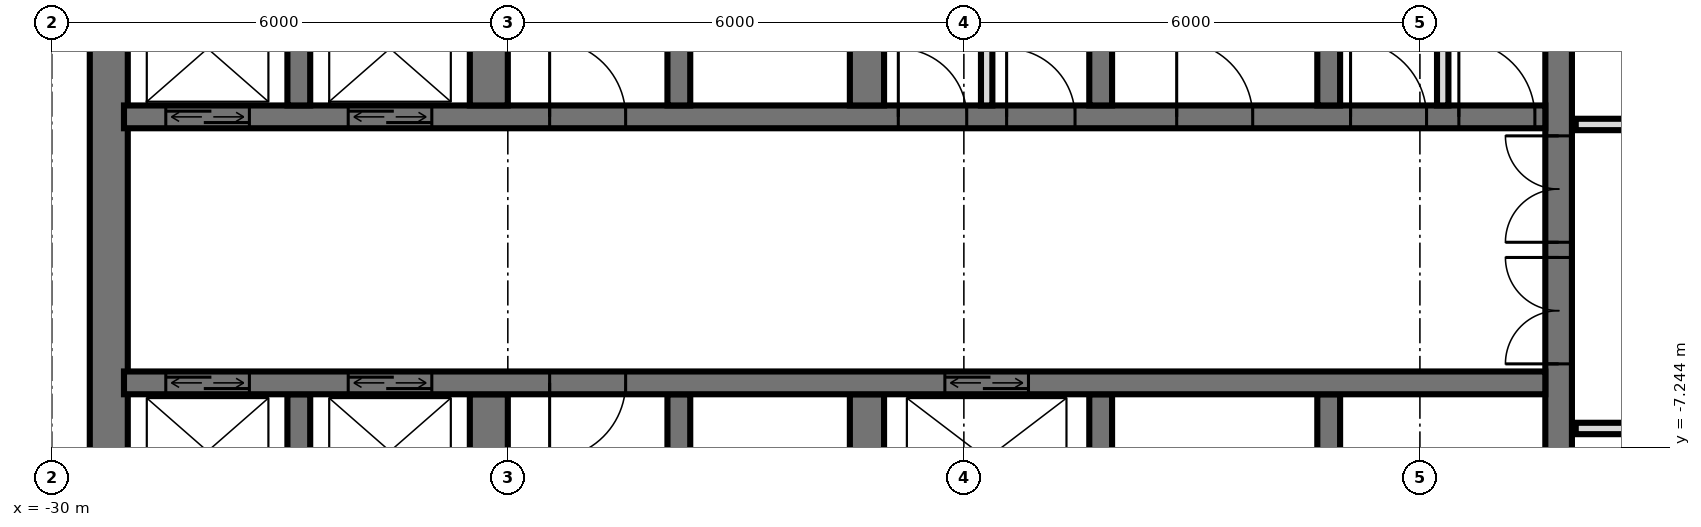
"""IFC4 building model, lengths in metres.
Left out: names, types, materials, properties, quantities, classifications, styles, units other than length and angle.
Written with IfcOpenShell. Run it as: python <this file> out.ifc"""

import sys

from ifc_helpers import new_model, si_unit, direction, frame, frame_2d, origin, place, context, subcontext, project, spatial, rectangle, extrude, element, fill, save


model = new_model("IFC4")
c1 = context("Model", 3, precision=1e-05, world=origin(), true_north=direction((0.0, 1.0)))
c2 = subcontext(c1, "Body", "Model", "MODEL_VIEW")
j1 = project(units=[si_unit("LENGTHUNIT", "METRE"), si_unit("PLANEANGLEUNIT", "RADIAN")], contexts=[c1])
p1 = place(None, origin())
s1 = spatial("IfcSite", under=j1, at=p1, CompositionType="ELEMENT")
p2 = place(p1, origin())
s2 = spatial("IfcBuilding", under=s1, at=p2, CompositionType="ELEMENT")
p3 = place(p2, frame((0.0, 0.0, 27.6)))
s3 = spatial("IfcBuildingStorey", under=s2, at=p3, CompositionType="ELEMENT", Elevation=27.6)
p4 = place(p3, frame((-10.175, -14.55, 0.0), z_axis=(0.0, 0.0, 1.0), x_axis=(0.0, 1.0, 0.0)))
e1 = element("IfcWall", 1, at=p4, inside=s3, PredefinedType="SHEAR", context=c2, shape_type="SweptSolid", body=[
    extrude(rectangle(XDim=14.1, YDim=0.35, at=frame_2d((7.05, 0.0))), origin(), (0.0, 0.0, 1.0), 3.6),
])
p5 = place(p4, frame((8.4, 0.0, 0.0)))
e2 = element("IfcOpeningElement", 2, at=p5, cuts=e1, PredefinedType="OPENING", context=c2, shape_type="SweptSolid", body=[
    extrude(rectangle(XDim=1.4, YDim=2.4, at=frame_2d((0.7, 1.2))), frame((0.0, 0.185, 0.0), z_axis=(0.0, -1.0, 0.0), x_axis=(1.0, 0.0, 0.0)), (0.0, 0.0, 1.0), 0.37),
])
p6 = place(p4, frame((10.0, 0.0, 0.0)))
e3 = element("IfcOpeningElement", 3, at=p6, cuts=e1, PredefinedType="OPENING", context=c2, shape_type="SweptSolid", body=[
    extrude(rectangle(XDim=1.4, YDim=2.4, at=frame_2d((0.7, 1.2))), frame((0.0, 0.185, 0.0), z_axis=(0.0, -1.0, 0.0), x_axis=(1.0, 0.0, 0.0)), (0.0, 0.0, 1.0), 0.37),
])
p7 = place(p4, frame((4.0, 0.0, 0.0)))
e4 = element("IfcOpeningElement", 4, at=p7, cuts=e1, PredefinedType="OPENING", context=c2, shape_type="SweptSolid", body=[
    extrude(rectangle(XDim=1.2, YDim=2.1, at=frame_2d((0.6, 1.05))), frame((0.0, 0.185, 0.0), z_axis=(0.0, -1.0, 0.0), x_axis=(1.0, 0.0, 0.0)), (0.0, 0.0, 1.0), 0.37),
])
p8 = place(p3, frame((-29.25, -14.55, 0.0), z_axis=(0.0, 0.0, 1.0), x_axis=(0.0, 1.0, 0.0)))
e5 = element("IfcWall", 5, at=p8, inside=s3, PredefinedType="SHEAR", context=c2, shape_type="SweptSolid", body=[
    extrude(rectangle(XDim=14.1, YDim=0.5, at=frame_2d((7.05, 0.0))), origin(), (0.0, 0.0, 1.0), 3.6),
])
p9 = place(p3, frame((-29.05, -2.9, 0.0), z_axis=(0.0, 0.0, 1.0), x_axis=(1.0, 0.0, 0.0)))
e6 = element("IfcWall", 6, at=p9, inside=s3, PredefinedType="SHEAR", context=c2, shape_type="SweptSolid", body=[
    extrude(rectangle(XDim=18.7, YDim=0.3, at=frame_2d((9.35, 0.0))), origin(), (0.0, 0.0, 1.0), 3.6),
])
p10 = place(p9, frame((2.95, 0.0, 0.0)))
e7 = element("IfcOpeningElement", 7, at=p10, cuts=e6, PredefinedType="OPENING", context=c2, shape_type="SweptSolid", body=[
    extrude(rectangle(XDim=1.1, YDim=2.1, at=frame_2d((0.55, 1.05))), frame((0.0, 0.16, 0.0), z_axis=(0.0, -1.0, 0.0), x_axis=(1.0, 0.0, 0.0)), (0.0, 0.0, 1.0), 0.32),
])
p11 = place(p9, frame((0.55, 0.0, 0.0)))
e8 = element("IfcOpeningElement", 8, at=p11, cuts=e6, PredefinedType="OPENING", context=c2, shape_type="SweptSolid", body=[
    extrude(rectangle(XDim=1.1, YDim=2.1, at=frame_2d((0.55, 1.05))), frame((0.0, 0.16, 0.0), z_axis=(0.0, -1.0, 0.0), x_axis=(1.0, 0.0, 0.0)), (0.0, 0.0, 1.0), 0.32),
])
p12 = place(p9, frame((11.613, 0.0, 0.0)))
e9 = element("IfcOpeningElement", 9, at=p12, cuts=e6, PredefinedType="OPENING", context=c2, shape_type="SweptSolid", body=[
    extrude(rectangle(XDim=0.9, YDim=2.1, at=frame_2d((0.45, 1.05))), frame((0.0, 0.16, 0.0), z_axis=(0.0, -1.0, 0.0), x_axis=(1.0, 0.0, 0.0)), (0.0, 0.0, 1.0), 0.32),
])
p13 = place(p9, frame((10.188, 0.0, 0.0)))
e10 = element("IfcOpeningElement", 10, at=p13, cuts=e6, PredefinedType="OPENING", context=c2, shape_type="SweptSolid", body=[
    extrude(rectangle(XDim=0.9, YDim=2.1, at=frame_2d((0.45, 1.05))), frame((0.0, 0.16, 0.0), z_axis=(0.0, -1.0, 0.0), x_axis=(1.0, 0.0, 0.0)), (0.0, 0.0, 1.0), 0.32),
])
p14 = place(p9, frame((17.562, 0.0, 0.0)))
e11 = element("IfcOpeningElement", 11, at=p14, cuts=e6, PredefinedType="OPENING", context=c2, shape_type="SweptSolid", body=[
    extrude(rectangle(XDim=1.0, YDim=2.1, at=frame_2d((0.5, 1.05))), frame((0.0, 0.16, 0.0), z_axis=(0.0, -1.0, 0.0), x_axis=(1.0, 0.0, 0.0)), (0.0, 0.0, 1.0), 0.32),
])
p15 = place(p9, frame((16.137, 0.0, 0.0)))
e12 = element("IfcOpeningElement", 12, at=p15, cuts=e6, PredefinedType="OPENING", context=c2, shape_type="SweptSolid", body=[
    extrude(rectangle(XDim=1.0, YDim=2.1, at=frame_2d((0.5, 1.05))), frame((0.0, 0.16, 0.0), z_axis=(0.0, -1.0, 0.0), x_axis=(1.0, 0.0, 0.0)), (0.0, 0.0, 1.0), 0.32),
])
p16 = place(p9, frame((13.85, 0.0, 0.0)))
e13 = element("IfcOpeningElement", 13, at=p16, cuts=e6, PredefinedType="OPENING", context=c2, shape_type="SweptSolid", body=[
    extrude(rectangle(XDim=1.0, YDim=2.1, at=frame_2d((0.5, 1.05))), frame((0.0, 0.16, 0.0), z_axis=(0.0, -1.0, 0.0), x_axis=(1.0, 0.0, 0.0)), (0.0, 0.0, 1.0), 0.32),
])
p17 = place(p9, frame((5.6, 0.0, 0.0)))
e14 = element("IfcOpeningElement", 14, at=p17, cuts=e6, PredefinedType="OPENING", context=c2, shape_type="SweptSolid", body=[
    extrude(rectangle(XDim=1.0, YDim=2.1, at=frame_2d((0.5, 1.05))), frame((0.0, 0.16, 0.0), z_axis=(0.0, -1.0, 0.0), x_axis=(1.0, 0.0, 0.0)), (0.0, 0.0, 1.0), 0.32),
])
p18 = place(p3, frame((-29.05, -6.4, 0.0), z_axis=(0.0, 0.0, 1.0), x_axis=(1.0, 0.0, 0.0)))
e15 = element("IfcWall", 15, at=p18, inside=s3, PredefinedType="SHEAR", context=c2, shape_type="SweptSolid", body=[
    extrude(rectangle(XDim=18.7, YDim=0.3, at=frame_2d((9.35, 0.0))), origin(), (0.0, 0.0, 1.0), 3.6),
])
p19 = place(p18, frame((2.95, 0.0, 0.0)))
e16 = element("IfcOpeningElement", 16, at=p19, cuts=e15, PredefinedType="OPENING", context=c2, shape_type="SweptSolid", body=[
    extrude(rectangle(XDim=1.1, YDim=2.1, at=frame_2d((0.55, 1.05))), frame((0.0, 0.16, 0.0), z_axis=(0.0, -1.0, 0.0), x_axis=(1.0, 0.0, 0.0)), (0.0, 0.0, 1.0), 0.32),
])
p20 = place(p18, frame((0.55, 0.0, 0.0)))
e17 = element("IfcOpeningElement", 17, at=p20, cuts=e15, PredefinedType="OPENING", context=c2, shape_type="SweptSolid", body=[
    extrude(rectangle(XDim=1.1, YDim=2.1, at=frame_2d((0.55, 1.05))), frame((0.0, 0.16, 0.0), z_axis=(0.0, -1.0, 0.0), x_axis=(1.0, 0.0, 0.0)), (0.0, 0.0, 1.0), 0.32),
])
p21 = place(p18, frame((10.8, 0.0, 0.0)))
e18 = element("IfcOpeningElement", 18, at=p21, cuts=e15, PredefinedType="OPENING", context=c2, shape_type="SweptSolid", body=[
    extrude(rectangle(XDim=1.1, YDim=2.1, at=frame_2d((0.55, 1.05))), frame((0.0, 0.16, 0.0), z_axis=(0.0, -1.0, 0.0), x_axis=(1.0, 0.0, 0.0)), (0.0, 0.0, 1.0), 0.32),
])
p22 = place(p18, frame((5.6, 0.0, 0.0)))
e19 = element("IfcOpeningElement", 19, at=p22, cuts=e15, PredefinedType="OPENING", context=c2, shape_type="SweptSolid", body=[
    extrude(rectangle(XDim=1.0, YDim=2.1, at=frame_2d((0.5, 1.05))), frame((0.0, 0.16, 0.0), z_axis=(0.0, -1.0, 0.0), x_axis=(1.0, 0.0, 0.0)), (0.0, 0.0, 1.0), 0.32),
])
for number, where, z_axis, x_axis in (
    (20, (-13.2, -2.75, 0.0), (0.0, 0.0, 1.0), (0.0, 1.0, 0.0)),
    (21, (-13.2, -8.85, 0.0), (0.0, 0.0, 1.0), (0.0, 1.0, 0.0)),
    (22, (-16.2, -2.75, 0.0), (0.0, 0.0, 1.0), (0.0, 1.0, 0.0)),
    (23, (-16.2, -8.85, 0.0), (0.0, 0.0, 1.0), (0.0, 1.0, 0.0)),
):
    element("IfcWall", number, at=place(p3, frame(where, z_axis=z_axis, x_axis=x_axis)), inside=s3, PredefinedType="SHEAR", context=c2, shape_type="SweptSolid", body=[
        extrude(rectangle(XDim=2.3, YDim=0.3, at=frame_2d((1.15, 0.0))), origin(), (0.0, 0.0, 1.0), 3.6),
    ])
for number, where, z_axis, x_axis in (
    (24, (-19.275, -2.75, 0.0), (0.0, 0.0, 1.0), (0.0, 1.0, 0.0)),
    (25, (-19.275, -8.85, 0.0), (0.0, 0.0, 1.0), (0.0, 1.0, 0.0)),
):
    element("IfcWall", number, at=place(p3, frame(where, z_axis=z_axis, x_axis=x_axis)), inside=s3, PredefinedType="SHEAR", context=c2, shape_type="SweptSolid", body=[
        extrude(rectangle(XDim=2.3, YDim=0.45, at=frame_2d((1.15, 0.0))), origin(), (0.0, 0.0, 1.0), 3.6),
    ])
for number, where, z_axis, x_axis in (
    (26, (-21.75, -2.75, 0.0), (0.0, 0.0, 1.0), (0.0, 1.0, 0.0)),
    (27, (-21.75, -8.85, 0.0), (0.0, 0.0, 1.0), (0.0, 1.0, 0.0)),
):
    element("IfcWall", number, at=place(p3, frame(where, z_axis=z_axis, x_axis=x_axis)), inside=s3, PredefinedType="SHEAR", context=c2, shape_type="SweptSolid", body=[
        extrude(rectangle(XDim=2.3, YDim=0.3, at=frame_2d((1.15, 0.0))), origin(), (0.0, 0.0, 1.0), 3.6),
    ])
for number, where, z_axis, x_axis in (
    (28, (-24.25, -2.75, 0.0), (0.0, 0.0, 1.0), (0.0, 1.0, 0.0)),
    (29, (-24.25, -8.85, 0.0), (0.0, 0.0, 1.0), (0.0, 1.0, 0.0)),
):
    element("IfcWall", number, at=place(p3, frame(where, z_axis=z_axis, x_axis=x_axis)), inside=s3, PredefinedType="SHEAR", context=c2, shape_type="SweptSolid", body=[
        extrude(rectangle(XDim=2.3, YDim=0.5, at=frame_2d((1.15, 0.0))), origin(), (0.0, 0.0, 1.0), 3.6),
    ])
for number, where, z_axis, x_axis in (
    (30, (-26.75, -2.75, 0.0), (0.0, 0.0, 1.0), (0.0, 1.0, 0.0)),
    (31, (-26.75, -8.85, 0.0), (0.0, 0.0, 1.0), (0.0, 1.0, 0.0)),
):
    element("IfcWall", number, at=place(p3, frame(where, z_axis=z_axis, x_axis=x_axis)), inside=s3, PredefinedType="SHEAR", context=c2, shape_type="SweptSolid", body=[
        extrude(rectangle(XDim=2.3, YDim=0.3, at=frame_2d((1.15, 0.0))), origin(), (0.0, 0.0, 1.0), 3.6),
    ])
for number, where, z_axis, x_axis in (
    (32, (-17.7, -2.75, 0.0), (0.0, 0.0, 1.0), (0.0, 1.0, 0.0)),
    (33, (-11.7, -2.75, 0.0), (0.0, 0.0, 1.0), (0.0, 1.0, 0.0)),
):
    element("IfcWall", number, at=place(p3, frame(where, z_axis=z_axis, x_axis=x_axis)), inside=s3, PredefinedType="PARTITIONING", context=c2, shape_type="SweptSolid", body=[
        extrude(rectangle(XDim=2.3, YDim=0.15, at=frame_2d((1.15, 0.0))), origin(), (0.0, 0.0, 1.0), 3.3),
    ])
p23 = place(p3, frame((-9.95, -7.0, 0.0), z_axis=(0.0, 0.0, 1.0), x_axis=(1.0, 0.0, 0.0)))
e34 = element("IfcWall", 34, at=p23, inside=s3, PredefinedType="PARTITIONING", context=c2, shape_type="SweptSolid", body=[
    extrude(rectangle(XDim=19.9, YDim=0.15, at=frame_2d((9.95, 0.0))), origin(), (0.0, 0.0, 1.0), 3.32),
])
p24 = place(p23, frame((9.45, 0.0, 0.0)))
e35 = element("IfcOpeningElement", 35, at=p24, cuts=e34, PredefinedType="OPENING", context=c2, shape_type="SweptSolid", body=[
    extrude(rectangle(XDim=1.0, YDim=2.1, at=frame_2d((0.5, 1.05))), frame((0.0, 0.085, 0.0), z_axis=(0.0, -1.0, 0.0), x_axis=(1.0, 0.0, 0.0)), (0.0, 0.0, 1.0), 0.17),
])
p25 = place(p23, frame((3.45, 0.0, 0.0)))
e36 = element("IfcOpeningElement", 36, at=p25, cuts=e34, PredefinedType="OPENING", context=c2, shape_type="SweptSolid", body=[
    extrude(rectangle(XDim=1.0, YDim=2.1, at=frame_2d((0.5, 1.05))), frame((0.0, 0.085, 0.0), z_axis=(0.0, -1.0, 0.0), x_axis=(1.0, 0.0, 0.0)), (0.0, 0.0, 1.0), 0.17),
])
p26 = place(p3, frame((-9.95, -3.0, 0.0), z_axis=(0.0, 0.0, 1.0), x_axis=(1.0, 0.0, 0.0)))
e37 = element("IfcWall", 37, at=p26, inside=s3, PredefinedType="PARTITIONING", context=c2, shape_type="SweptSolid", body=[
    extrude(rectangle(XDim=19.9, YDim=0.15, at=frame_2d((9.95, 0.0))), origin(), (0.0, 0.0, 1.0), 3.32),
])
p27 = place(p26, frame((0.95, 0.0, 0.0)))
e38 = element("IfcOpeningElement", 38, at=p27, cuts=e37, PredefinedType="OPENING", context=c2, shape_type="SweptSolid", body=[
    extrude(rectangle(XDim=1.0, YDim=2.1, at=frame_2d((0.5, 1.05))), frame((0.0, 0.085, 0.0), z_axis=(0.0, -1.0, 0.0), x_axis=(1.0, 0.0, 0.0)), (0.0, 0.0, 1.0), 0.17),
])
p28 = place(p26, frame((3.7, 0.0, 0.0)))
e39 = element("IfcOpeningElement", 39, at=p28, cuts=e37, PredefinedType="OPENING", context=c2, shape_type="SweptSolid", body=[
    extrude(rectangle(XDim=1.0, YDim=2.1, at=frame_2d((0.5, 1.05))), frame((0.0, 0.085, 0.0), z_axis=(0.0, -1.0, 0.0), x_axis=(1.0, 0.0, 0.0)), (0.0, 0.0, 1.0), 0.17),
])
p29 = place(p26, frame((8.45, 0.0, 0.0)))
e40 = element("IfcOpeningElement", 40, at=p29, cuts=e37, PredefinedType="OPENING", context=c2, shape_type="SweptSolid", body=[
    extrude(rectangle(XDim=1.0, YDim=2.1, at=frame_2d((0.5, 1.05))), frame((0.0, 0.085, 0.0), z_axis=(0.0, -1.0, 0.0), x_axis=(1.0, 0.0, 0.0)), (0.0, 0.0, 1.0), 0.17),
])
p30 = place(p26, frame((15.7, 0.0, 0.0)))
e41 = element("IfcOpeningElement", 41, at=p30, cuts=e37, PredefinedType="OPENING", context=c2, shape_type="SweptSolid", body=[
    extrude(rectangle(XDim=1.0, YDim=2.1, at=frame_2d((0.5, 1.05))), frame((0.0, 0.085, 0.0), z_axis=(0.0, -1.0, 0.0), x_axis=(1.0, 0.0, 0.0)), (0.0, 0.0, 1.0), 0.17),
])
p31 = place(p10, origin())
e42 = element("IfcDoor", 42, at=p31, inside=s3, OperationType="DOUBLE_DOOR_SLIDING", PredefinedType="USERDEFINED", context=c2, shape_type="SweptSolid", body=[
    extrude(rectangle(XDim=1.1, YDim=2.1, at=frame_2d((0.55, 1.05))), frame((0.0, 0.025, 0.0), z_axis=(0.0, -1.0, 0.0), x_axis=(1.0, 0.0, 0.0)), (0.0, 0.0, 1.0), 0.05),
])
fill(e7, e42)
p32 = place(p11, origin())
e43 = element("IfcDoor", 43, at=p32, inside=s3, OperationType="DOUBLE_DOOR_SLIDING", PredefinedType="USERDEFINED", context=c2, shape_type="SweptSolid", body=[
    extrude(rectangle(XDim=1.1, YDim=2.1, at=frame_2d((0.55, 1.05))), frame((0.0, 0.025, 0.0), z_axis=(0.0, -1.0, 0.0), x_axis=(1.0, 0.0, 0.0)), (0.0, 0.0, 1.0), 0.05),
])
fill(e8, e43)
p33 = place(p19, origin())
e44 = element("IfcDoor", 44, at=p33, inside=s3, OperationType="DOUBLE_DOOR_SLIDING", PredefinedType="USERDEFINED", context=c2, shape_type="SweptSolid", body=[
    extrude(rectangle(XDim=1.1, YDim=2.1, at=frame_2d((0.55, 1.05))), frame((0.0, 0.025, 0.0), z_axis=(0.0, -1.0, 0.0), x_axis=(1.0, 0.0, 0.0)), (0.0, 0.0, 1.0), 0.05),
])
fill(e16, e44)
p34 = place(p20, origin())
e45 = element("IfcDoor", 45, at=p34, inside=s3, OperationType="DOUBLE_DOOR_SLIDING", PredefinedType="USERDEFINED", context=c2, shape_type="SweptSolid", body=[
    extrude(rectangle(XDim=1.1, YDim=2.1, at=frame_2d((0.55, 1.05))), frame((0.0, 0.025, 0.0), z_axis=(0.0, -1.0, 0.0), x_axis=(1.0, 0.0, 0.0)), (0.0, 0.0, 1.0), 0.05),
])
fill(e17, e45)
p35 = place(p21, origin())
e46 = element("IfcDoor", 46, at=p35, inside=s3, OperationType="DOUBLE_DOOR_SLIDING", PredefinedType="USERDEFINED", context=c2, shape_type="SweptSolid", body=[
    extrude(rectangle(XDim=1.1, YDim=2.1, at=frame_2d((0.55, 1.05))), frame((0.0, 0.025, 0.0), z_axis=(0.0, -1.0, 0.0), x_axis=(1.0, 0.0, 0.0)), (0.0, 0.0, 1.0), 0.05),
])
fill(e18, e46)
p36 = place(p5, origin())
e47 = element("IfcDoor", 47, at=p36, inside=s3, OperationType="DOUBLE_DOOR_SINGLE_SWING", PredefinedType="DOOR", context=c2, shape_type="SweptSolid", body=[
    extrude(rectangle(XDim=1.4, YDim=2.4, at=frame_2d((0.7, 1.2))), frame((0.0, 0.025, 0.0), z_axis=(0.0, -1.0, 0.0), x_axis=(1.0, 0.0, 0.0)), (0.0, 0.0, 1.0), 0.05),
])
fill(e2, e47)
p37 = place(p6, origin())
e48 = element("IfcDoor", 48, at=p37, inside=s3, OperationType="DOUBLE_DOOR_SINGLE_SWING", PredefinedType="DOOR", context=c2, shape_type="SweptSolid", body=[
    extrude(rectangle(XDim=1.4, YDim=2.4, at=frame_2d((0.7, 1.2))), frame((0.0, 0.025, 0.0), z_axis=(0.0, -1.0, 0.0), x_axis=(1.0, 0.0, 0.0)), (0.0, 0.0, 1.0), 0.05),
])
fill(e3, e48)
p38 = place(p12, origin())
e49 = element("IfcDoor", 49, at=p38, inside=s3, OperationType="SINGLE_SWING_RIGHT", PredefinedType="DOOR", context=c2, shape_type="SweptSolid", body=[
    extrude(rectangle(XDim=0.9, YDim=2.1, at=frame_2d((0.45, 1.05))), frame((0.0, 0.025, 0.0), z_axis=(0.0, -1.0, 0.0), x_axis=(1.0, 0.0, 0.0)), (0.0, 0.0, 1.0), 0.05),
])
fill(e9, e49)
p39 = place(p13, origin())
e50 = element("IfcDoor", 50, at=p39, inside=s3, OperationType="SINGLE_SWING_RIGHT", PredefinedType="DOOR", context=c2, shape_type="SweptSolid", body=[
    extrude(rectangle(XDim=0.9, YDim=2.1, at=frame_2d((0.45, 1.05))), frame((0.0, 0.025, 0.0), z_axis=(0.0, -1.0, 0.0), x_axis=(1.0, 0.0, 0.0)), (0.0, 0.0, 1.0), 0.05),
])
fill(e10, e50)
p40 = place(p14, origin())
e51 = element("IfcDoor", 51, at=p40, inside=s3, OperationType="SINGLE_SWING_RIGHT", PredefinedType="DOOR", context=c2, shape_type="SweptSolid", body=[
    extrude(rectangle(XDim=1.0, YDim=2.1, at=frame_2d((0.5, 1.05))), frame((0.0, 0.025, 0.0), z_axis=(0.0, -1.0, 0.0), x_axis=(1.0, 0.0, 0.0)), (0.0, 0.0, 1.0), 0.05),
])
fill(e11, e51)
p41 = place(p15, origin())
e52 = element("IfcDoor", 52, at=p41, inside=s3, OperationType="SINGLE_SWING_RIGHT", PredefinedType="DOOR", context=c2, shape_type="SweptSolid", body=[
    extrude(rectangle(XDim=1.0, YDim=2.1, at=frame_2d((0.5, 1.05))), frame((0.0, 0.025, 0.0), z_axis=(0.0, -1.0, 0.0), x_axis=(1.0, 0.0, 0.0)), (0.0, 0.0, 1.0), 0.05),
])
fill(e12, e52)
p42 = place(p16, origin())
e53 = element("IfcDoor", 53, at=p42, inside=s3, OperationType="SINGLE_SWING_RIGHT", PredefinedType="DOOR", context=c2, shape_type="SweptSolid", body=[
    extrude(rectangle(XDim=1.0, YDim=2.1, at=frame_2d((0.5, 1.05))), frame((0.0, 0.025, 0.0), z_axis=(0.0, -1.0, 0.0), x_axis=(1.0, 0.0, 0.0)), (0.0, 0.0, 1.0), 0.05),
])
fill(e13, e53)
p43 = place(p17, origin())
e54 = element("IfcDoor", 54, at=p43, inside=s3, OperationType="SINGLE_SWING_RIGHT", PredefinedType="DOOR", context=c2, shape_type="SweptSolid", body=[
    extrude(rectangle(XDim=1.0, YDim=2.1, at=frame_2d((0.5, 1.05))), frame((0.0, 0.025, 0.0), z_axis=(0.0, -1.0, 0.0), x_axis=(1.0, 0.0, 0.0)), (0.0, 0.0, 1.0), 0.05),
])
fill(e14, e54)
p44 = place(p22, frame((0.5, 0.0, 0.0), z_axis=(0.0, 0.0, 1.0), x_axis=(-1.0, 0.0, 0.0)))
e55 = element("IfcDoor", 55, at=p44, inside=s3, OperationType="SINGLE_SWING_LEFT", PredefinedType="DOOR", context=c2, shape_type="SweptSolid", body=[
    extrude(rectangle(XDim=1.0, YDim=2.1, at=frame_2d((0.0, 1.05))), frame((0.0, -0.025, 0.0), z_axis=(0.0, 1.0, 0.0), x_axis=(-1.0, 0.0, 0.0)), (0.0, 0.0, 1.0), 0.05),
])
fill(e19, e55)
save(model, sys.argv[1])
